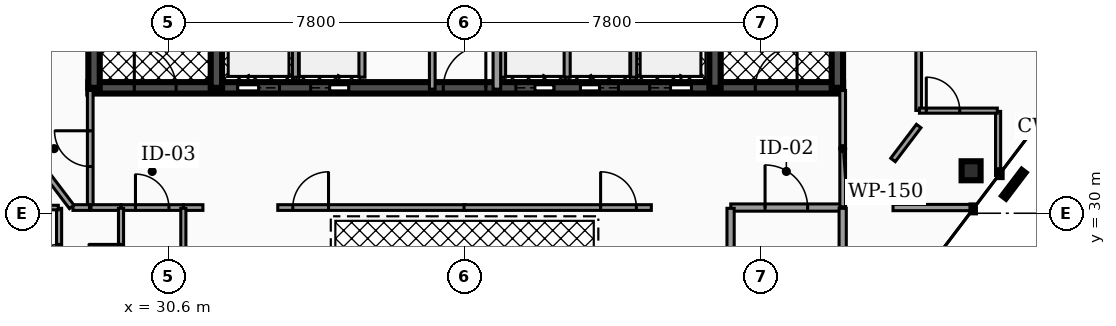
"""IFC4 building model, lengths in metres.
Left out: names, types, materials, properties, quantities, classifications, styles, units other than length and angle.
Written with IfcOpenShell. Run it as: python <this file> out.ifc"""

import sys

from ifc_helpers import new_model, si_unit, direction, frame, frame_2d, origin, origin_2d, place, context, subcontext, project, spatial, rectangle, hollow_rectangle, extrude, element, fill, save


model = new_model("IFC4")
c1 = context("Model", 3, precision=1e-05, world=origin(), true_north=direction((0.0, 1.0)))
c2 = subcontext(c1, "Body", "Model", "MODEL_VIEW")
j1 = project(units=[si_unit("LENGTHUNIT", "METRE"), si_unit("PLANEANGLEUNIT", "RADIAN")], contexts=[c1])
p1 = place(None, origin())
s1 = spatial("IfcSite", under=j1, at=p1, CompositionType="ELEMENT")
p2 = place(p1, origin())
s2 = spatial("IfcBuilding", under=s1, at=p2, CompositionType="ELEMENT")
p3 = place(p2, frame((0.0, 0.0, 261.8)))
s3 = spatial("IfcBuildingStorey", under=s2, at=p3, CompositionType="ELEMENT", Elevation=261.8)
p4 = place(p3, frame((28.5, 33.3, 0.0), z_axis=(0.0, 0.0, 1.0), x_axis=(1.0, 0.0, 0.0)))
e1 = element("IfcWall", 1, at=p4, inside=s3, PredefinedType="SHEAR", context=c2, shape_type="SweptSolid", body=[
    extrude(rectangle(XDim=19.86, YDim=0.3, at=frame_2d((9.93, 0.0))), origin(), (0.0, 0.0, 1.0), 3.18),
])
p5 = place(p4, frame((3.93, 0.0, 0.0)))
e2 = element("IfcOpeningElement", 2, at=p5, cuts=e1, PredefinedType="OPENING", context=c2, shape_type="SweptSolid", body=[
    extrude(rectangle(XDim=1.1, YDim=2.15, at=frame_2d((0.55, 1.075))), frame((0.0, 0.16, 0.0), z_axis=(0.0, -1.0, 0.0), x_axis=(1.0, 0.0, 0.0)), (0.0, 0.0, 1.0), 0.32),
])
p6 = place(p4, frame((14.77, 0.0, 0.0)))
e3 = element("IfcOpeningElement", 3, at=p6, cuts=e1, PredefinedType="OPENING", context=c2, shape_type="SweptSolid", body=[
    extrude(rectangle(XDim=1.1, YDim=2.15, at=frame_2d((0.55, 1.075))), frame((0.0, 0.16, 0.0), z_axis=(0.0, -1.0, 0.0), x_axis=(1.0, 0.0, 0.0)), (0.0, 0.0, 1.0), 0.32),
])
p7 = place(p4, frame((11.25, 0.0, 0.0)))
e4 = element("IfcOpeningElement", 4, at=p7, cuts=e1, PredefinedType="OPENING", context=c2, shape_type="SweptSolid", body=[
    extrude(rectangle(XDim=1.0, YDim=2.1, at=frame_2d((0.5, 1.05))), frame((0.0, 0.16, 0.0), z_axis=(0.0, -1.0, 0.0), x_axis=(1.0, 0.0, 0.0)), (0.0, 0.0, 1.0), 0.32),
])
p8 = place(p4, frame((12.95, 0.0, 0.0)))
e5 = element("IfcOpeningElement", 5, at=p8, cuts=e1, PredefinedType="OPENING", context=c2, shape_type="SweptSolid", body=[
    extrude(rectangle(XDim=1.0, YDim=2.1, at=frame_2d((0.5, 1.05))), frame((0.0, 0.16, 0.0), z_axis=(0.0, -1.0, 0.0), x_axis=(1.0, 0.0, 0.0)), (0.0, 0.0, 1.0), 0.32),
])
p9 = place(p4, frame((5.85, 0.0, 0.0)))
e6 = element("IfcOpeningElement", 6, at=p9, cuts=e1, PredefinedType="OPENING", context=c2, shape_type="SweptSolid", body=[
    extrude(rectangle(XDim=1.0, YDim=2.1, at=frame_2d((0.5, 1.05))), frame((0.0, 0.16, 0.0), z_axis=(0.0, -1.0, 0.0), x_axis=(1.0, 0.0, 0.0)), (0.0, 0.0, 1.0), 0.32),
])
p10 = place(p4, frame((1.21, 0.0, 0.0)))
e7 = element("IfcOpeningElement", 7, at=p10, cuts=e1, PredefinedType="OPENING", context=c2, shape_type="SweptSolid", body=[
    extrude(rectangle(XDim=1.1, YDim=2.2, at=frame_2d((0.55, 1.1))), frame((0.0, 0.16, 0.0), z_axis=(0.0, -1.0, 0.0), x_axis=(1.0, 0.0, 0.0)), (0.0, 0.0, 1.0), 0.32),
])
p11 = place(p4, frame((9.34, 0.0, 0.0)))
e8 = element("IfcOpeningElement", 8, at=p11, cuts=e1, PredefinedType="OPENING", context=c2, shape_type="SweptSolid", body=[
    extrude(rectangle(XDim=1.12, YDim=2.05, at=frame_2d((0.56, 1.025))), frame((0.0, 0.16, 0.0), z_axis=(0.0, -1.0, 0.0), x_axis=(1.0, 0.0, 0.0)), (0.0, 0.0, 1.0), 0.32),
])
p12 = place(p4, frame((17.55, 0.0, 0.0)))
e9 = element("IfcOpeningElement", 9, at=p12, cuts=e1, PredefinedType="OPENING", context=c2, shape_type="SweptSolid", body=[
    extrude(rectangle(XDim=1.1, YDim=2.2, at=frame_2d((0.55, 1.1))), frame((0.0, 0.16, 0.0), z_axis=(0.0, -1.0, 0.0), x_axis=(1.0, 0.0, 0.0)), (0.0, 0.0, 1.0), 0.32),
])
for number, where, z_axis, x_axis in (
    (10, (28.65, 33.3, 0.0), (0.0, 0.0, 1.0), (0.0, 1.0, 0.0)),
    (11, (31.87, 33.3, 0.0), (0.0, 0.0, 1.0), (0.0, 1.0, 0.0)),
    (12, (44.99, 33.3, 0.0), (0.0, 0.0, 1.0), (0.0, 1.0, 0.0)),
    (13, (48.21, 33.3, 0.0), (0.0, 0.0, 1.0), (0.0, 1.0, 0.0)),
):
    element("IfcWall", number, at=place(p3, frame(where, z_axis=z_axis, x_axis=x_axis)), inside=s3, PredefinedType="SHEAR", context=c2, shape_type="SweptSolid", body=[
        extrude(rectangle(XDim=10.1, YDim=0.3, at=frame_2d((5.05, 0.0))), origin(), (0.0, 0.0, 1.0), 3.18),
    ])
p13 = place(p3, frame((51.729, 31.117, 0.0), z_axis=(0.0, 0.0, 1.0), x_axis=(1.0, 0.0, 0.0)))
e14 = element("IfcColumn", 14, at=p13, inside=s3, PredefinedType="COLUMN", context=c2, shape_type="SweptSolid", body=[
    extrude(hollow_rectangle(XDim=0.5, YDim=0.5, WallThickness=0.025, at=origin_2d()), origin(), (0.0, 0.0, 1.0), 3.18),
])
for number, where, z_axis, x_axis in (
    (15, (33.95, 33.58, 0.0), (0.0, 0.0, 1.0), (0.0, 1.0, 0.0)),
    (16, (42.85, 33.58, 0.0), (0.0, 0.0, 1.0), (0.0, 1.0, 0.0)),
):
    element("IfcWall", number, at=place(p3, frame(where, z_axis=z_axis, x_axis=x_axis)), inside=s3, PredefinedType="SOLIDWALL", context=c2, shape_type="SweptSolid", body=[
        extrude(rectangle(XDim=2.45, YDim=0.16, at=frame_2d((1.225, 0.0))), origin(), (0.0, 0.0, 1.0), 3.18),
    ])
for number, where, z_axis, x_axis in (
    (17, (39.4, 33.58, 0.0), (0.0, 0.0, 1.0), (0.0, 1.0, 0.0)),
    (18, (41.1, 33.58, 0.0), (0.0, 0.0, 1.0), (0.0, 1.0, 0.0)),
    (19, (35.7, 33.58, 0.0), (0.0, 0.0, 1.0), (0.0, 1.0, 0.0)),
):
    element("IfcWall", number, at=place(p3, frame(where, z_axis=z_axis, x_axis=x_axis)), inside=s3, PredefinedType="SOLIDWALL", context=c2, shape_type="SweptSolid", body=[
        extrude(rectangle(XDim=2.25, YDim=0.16, at=frame_2d((1.125, 0.0))), origin(), (0.0, 0.0, 1.0), 3.18),
    ])
p14 = place(p3, frame((37.55, 33.265, 0.0), z_axis=(0.0, 0.0, 1.0), x_axis=(0.0, 1.0, 0.0)))
e20 = element("IfcWall", 20, at=p14, inside=s3, PredefinedType="PARTITIONING", context=c2, shape_type="SweptSolid", body=[
    extrude(rectangle(XDim=3.615, YDim=0.15, at=frame_2d((1.808, 0.0))), origin(), (0.0, 0.0, 1.0), 2.235),
])
p15 = place(p14, frame((1.337, 0.0, 0.0)))
e21 = element("IfcOpeningElement", 21, at=p15, cuts=e20, PredefinedType="OPENING", context=c2, shape_type="SweptSolid", body=[
    extrude(rectangle(XDim=0.94, YDim=2.05, at=frame_2d((0.47, 1.025))), frame((0.0, 0.085, 0.0), z_axis=(0.0, -1.0, 0.0), x_axis=(1.0, 0.0, 0.0)), (0.0, 0.0, 1.0), 0.17),
])
p16 = place(p3, frame((39.25, 33.265, 0.0), z_axis=(0.0, 0.0, 1.0), x_axis=(0.0, 1.0, 0.0)))
e22 = element("IfcWall", 22, at=p16, inside=s3, PredefinedType="PARTITIONING", context=c2, shape_type="SweptSolid", body=[
    extrude(rectangle(XDim=3.615, YDim=0.2, at=frame_2d((1.808, 0.0))), origin(), (0.0, 0.0, 1.0), 2.235),
])
p17 = place(p3, frame((45.405, 30.15, 0.0), z_axis=(0.0, 0.0, 1.0), x_axis=(1.0, 0.0, 0.0)))
e23 = element("IfcWall", 23, at=p17, inside=s3, PredefinedType="PARTITIONING", context=c2, shape_type="SweptSolid", body=[
    extrude(rectangle(XDim=2.925, YDim=0.19, at=frame_2d((1.462, 0.0))), origin(), (0.0, 0.0, 1.0), 2.235),
])
p18 = place(p17, frame((0.903, 0.0, 0.0)))
e24 = element("IfcOpeningElement", 24, at=p18, cuts=e23, PredefinedType="OPENING", context=c2, shape_type="SweptSolid", body=[
    extrude(rectangle(XDim=1.12, YDim=2.05, at=frame_2d((0.56, 1.025))), frame((0.0, 0.105, 0.0), z_axis=(0.0, -1.0, 0.0), x_axis=(1.0, 0.0, 0.0)), (0.0, 0.0, 1.0), 0.21),
])
p19 = place(p3, frame((28.55, 30.17, 0.0), z_axis=(0.0, 0.0, 1.0), x_axis=(0.0, 1.0, 0.0)))
e25 = element("IfcWall", 25, at=p19, inside=s3, PredefinedType="PARTITIONING", context=c2, shape_type="SweptSolid", body=[
    extrude(rectangle(XDim=3.06, YDim=0.15, at=frame_2d((1.53, 0.0))), origin(), (0.0, 0.0, 1.0), 2.235),
])
p20 = place(p19, frame((1.06, 0.0, 0.0)))
e26 = element("IfcOpeningElement", 26, at=p20, cuts=e25, PredefinedType="OPENING", context=c2, shape_type="SweptSolid", body=[
    extrude(rectangle(XDim=0.94, YDim=2.05, at=frame_2d((0.47, 1.025))), frame((0.0, 0.085, 0.0), z_axis=(0.0, -1.0, 0.0), x_axis=(1.0, 0.0, 0.0)), (0.0, 0.0, 1.0), 0.17),
])
p21 = place(p3, frame((48.35, 30.17, 0.0), z_axis=(0.0, 0.0, 1.0), x_axis=(0.0, 1.0, 0.0)))
e27 = element("IfcWall", 27, at=p21, inside=s3, PredefinedType="PARTITIONING", context=c2, shape_type="SweptSolid", body=[
    extrude(rectangle(XDim=3.06, YDim=0.15, at=frame_2d((1.53, 0.0))), origin(), (0.0, 0.0, 1.0), 2.235),
])
p22 = place(p3, frame((28.57, 30.15, 0.0), z_axis=(0.0, 0.0, 1.0), x_axis=(1.0, 0.0, 0.0)))
e28 = element("IfcWall", 28, at=p22, inside=s3, PredefinedType="PARTITIONING", context=c2, shape_type="SweptSolid", body=[
    extrude(rectangle(XDim=0.785, YDim=0.15, at=frame_2d((0.393, 0.0))), origin(), (0.0, 0.0, 1.0), 2.235),
])
p23 = place(p3, frame((29.365, 30.15, 0.0), z_axis=(0.0, 0.0, 1.0), x_axis=(1.0, 0.0, 0.0)))
e29 = element("IfcWall", 29, at=p23, inside=s3, PredefinedType="PARTITIONING", context=c2, shape_type="SweptSolid", body=[
    extrude(rectangle(XDim=1.63, YDim=0.15, at=frame_2d((0.815, 0.0))), origin(), (0.0, 0.0, 1.0), 2.235),
])
p24 = place(p23, frame((0.375, 0.0, 0.0)))
e30 = element("IfcOpeningElement", 30, at=p24, cuts=e29, PredefinedType="OPENING", context=c2, shape_type="SweptSolid", body=[
    extrude(rectangle(XDim=0.88, YDim=2.05, at=frame_2d((0.44, 1.025))), frame((0.0, 0.085, 0.0), z_axis=(0.0, -1.0, 0.0), x_axis=(1.0, 0.0, 0.0)), (0.0, 0.0, 1.0), 0.17),
])
p25 = place(p3, frame((33.485, 30.15, 0.0), z_axis=(0.0, 0.0, 1.0), x_axis=(1.0, 0.0, 0.0)))
e31 = element("IfcWall", 31, at=p25, inside=s3, PredefinedType="PARTITIONING", context=c2, shape_type="SweptSolid", body=[
    extrude(rectangle(XDim=4.93, YDim=0.15, at=frame_2d((2.465, 0.0))), origin(), (0.0, 0.0, 1.0), 2.235),
])
p26 = place(p25, frame((0.395, 0.0, 0.0)))
e32 = element("IfcOpeningElement", 32, at=p26, cuts=e31, PredefinedType="OPENING", context=c2, shape_type="SweptSolid", body=[
    extrude(rectangle(XDim=0.94, YDim=2.05, at=frame_2d((0.47, 1.025))), frame((0.0, 0.085, 0.0), z_axis=(0.0, -1.0, 0.0), x_axis=(1.0, 0.0, 0.0)), (0.0, 0.0, 1.0), 0.17),
])
p27 = place(p3, frame((31.005, 30.15, 0.0), z_axis=(0.0, 0.0, 1.0), x_axis=(1.0, 0.0, 0.0)))
e33 = element("IfcWall", 33, at=p27, inside=s3, PredefinedType="PARTITIONING", context=c2, shape_type="SweptSolid", body=[
    extrude(rectangle(XDim=0.51, YDim=0.15, at=frame_2d((0.255, 0.0))), origin(), (0.0, 0.0, 1.0), 2.235),
])
p28 = place(p3, frame((38.385, 30.15, 0.0), z_axis=(0.0, 0.0, 1.0), x_axis=(1.0, 0.0, 0.0)))
e34 = element("IfcWall", 34, at=p28, inside=s3, PredefinedType="PARTITIONING", context=c2, shape_type="SweptSolid", body=[
    extrude(rectangle(XDim=4.93, YDim=0.15, at=frame_2d((2.465, 0.0))), origin(), (0.0, 0.0, 1.0), 2.235),
])
p29 = place(p28, frame((3.595, 0.0, 0.0)))
e35 = element("IfcOpeningElement", 35, at=p29, cuts=e34, PredefinedType="OPENING", context=c2, shape_type="SweptSolid", body=[
    extrude(rectangle(XDim=0.94, YDim=2.05, at=frame_2d((0.47, 1.025))), frame((0.0, 0.085, 0.0), z_axis=(0.0, -1.0, 0.0), x_axis=(1.0, 0.0, 0.0)), (0.0, 0.0, 1.0), 0.17),
])
for number, where, z_axis, x_axis in (
    (36, (45.4, 27.37, 0.0), (0.0, 0.0, 1.0), (0.0, 1.0, 0.0)),
    (37, (48.35, 27.37, 0.0), (0.0, 0.0, 1.0), (0.0, 1.0, 0.0)),
):
    element("IfcWall", number, at=place(p3, frame(where, z_axis=z_axis, x_axis=x_axis)), inside=s3, PredefinedType="PARTITIONING", context=c2, shape_type="SweptSolid", body=[
        extrude(rectangle(XDim=2.76, YDim=0.19, at=frame_2d((1.38, 0.0))), origin(), (0.0, 0.0, 1.0), 2.235),
    ])
p30 = place(p3, frame((28.094, 30.15, 0.0), z_axis=(0.0, 0.0, 1.0), x_axis=(1.0, 0.0, 0.0)))
e38 = element("IfcWall", 38, at=p30, inside=s3, PredefinedType="PARTITIONING", context=c2, shape_type="SweptSolid", body=[
    extrude(rectangle(XDim=0.436, YDim=0.15, at=frame_2d((0.218, 0.0))), origin(), (0.0, 0.0, 1.0), 2.235),
])
p31 = place(p3, frame((26.562, 32.146, 0.0), z_axis=(0.0, 0.0, 1.0), x_axis=(0.603891739408, -0.797066350485, 0.0)))
e39 = element("IfcWall", 39, at=p31, inside=s3, PredefinedType="PARTITIONING", context=c2, shape_type="SweptSolid", body=[
    extrude(rectangle(XDim=2.485, YDim=0.15, at=frame_2d((1.242, 0.0))), origin(), (0.0, 0.0, 1.0), 2.235),
])
p32 = place(p3, frame((50.35, 32.705, 0.0), z_axis=(0.0, 0.0, 1.0), x_axis=(0.0, 1.0, 0.0)))
e40 = element("IfcWall", 40, at=p32, inside=s3, PredefinedType="PARTITIONING", context=c2, shape_type="SweptSolid", body=[
    extrude(rectangle(XDim=10.845, YDim=0.15, at=frame_2d((5.422, 0.0))), origin(), (0.0, 0.0, 1.0), 2.235),
])
p33 = place(p32, frame((4.952, 0.0, 0.0)))
e41 = element("IfcOpeningElement", 41, at=p33, cuts=e40, PredefinedType="OPENING", context=c2, shape_type="SweptSolid", body=[
    extrude(rectangle(XDim=0.94, YDim=2.05, at=frame_2d((0.47, 1.025))), frame((0.0, 0.085, 0.0), z_axis=(0.0, -1.0, 0.0), x_axis=(1.0, 0.0, 0.0)), (0.0, 0.0, 1.0), 0.17),
])
p34 = place(p3, frame((49.674, 31.403, 0.0), z_axis=(0.0, 0.0, 1.0), x_axis=(0.603937499622, 0.797031678511, 0.0)))
e42 = element("IfcWall", 42, at=p34, inside=s3, PredefinedType="PARTITIONING", context=c2, shape_type="SweptSolid", body=[
    extrude(rectangle(XDim=1.119, YDim=0.15, at=frame_2d((0.56, 0.0))), origin(), (0.0, 0.0, 1.0), 2.235),
])
p35 = place(p3, frame((29.36, 27.37, 0.0), z_axis=(0.0, 0.0, 1.0), x_axis=(0.0, 1.0, 0.0)))
e43 = element("IfcWall", 43, at=p35, inside=s3, PredefinedType="PARTITIONING", context=c2, shape_type="SweptSolid", body=[
    extrude(rectangle(XDim=2.76, YDim=0.135, at=frame_2d((1.38, 0.0))), origin(), (0.0, 0.0, 1.0), 2.235),
])
p36 = place(p35, frame((0.95, 0.0, 0.0)))
e44 = element("IfcOpeningElement", 44, at=p36, cuts=e43, PredefinedType="OPENING", context=c2, shape_type="SweptSolid", body=[
    extrude(rectangle(XDim=0.86, YDim=2.05, at=frame_2d((0.43, 1.025))), frame((0.0, 0.077, 0.0), z_axis=(0.0, -1.0, 0.0), x_axis=(1.0, 0.0, 0.0)), (0.0, 0.0, 1.0), 0.155),
])
p37 = place(p3, frame((27.73, 27.37, 0.0), z_axis=(0.0, 0.0, 1.0), x_axis=(0.0, 1.0, 0.0)))
e45 = element("IfcWall", 45, at=p37, inside=s3, PredefinedType="PARTITIONING", context=c2, shape_type="SweptSolid", body=[
    extrude(rectangle(XDim=2.76, YDim=0.135, at=frame_2d((1.38, 0.0))), origin(), (0.0, 0.0, 1.0), 2.235),
])
p38 = place(p37, frame((0.95, 0.0, 0.0)))
e46 = element("IfcOpeningElement", 46, at=p38, cuts=e45, PredefinedType="OPENING", context=c2, shape_type="SweptSolid", body=[
    extrude(rectangle(XDim=0.86, YDim=2.05, at=frame_2d((0.43, 1.025))), frame((0.0, 0.077, 0.0), z_axis=(0.0, -1.0, 0.0), x_axis=(1.0, 0.0, 0.0)), (0.0, 0.0, 1.0), 0.155),
])
p39 = place(p3, frame((31.0, 27.37, 0.0), z_axis=(0.0, 0.0, 1.0), x_axis=(0.0, 1.0, 0.0)))
e47 = element("IfcWall", 47, at=p39, inside=s3, PredefinedType="PARTITIONING", context=c2, shape_type="SweptSolid", body=[
    extrude(rectangle(XDim=2.76, YDim=0.135, at=frame_2d((1.38, 0.0))), origin(), (0.0, 0.0, 1.0), 2.235),
])
p40 = place(p3, frame((26.12, 30.15, 0.0), z_axis=(0.0, 0.0, 1.0), x_axis=(1.0, 0.0, 0.0)))
e48 = element("IfcWall", 48, at=p40, inside=s3, PredefinedType="PARTITIONING", context=c2, shape_type="SweptSolid", body=[
    extrude(rectangle(XDim=1.59, YDim=0.12, at=frame_2d((0.795, 0.0))), origin(), (0.0, 0.0, 1.0), 2.235),
])
p41 = place(p3, frame((49.674, 30.15, 0.0), z_axis=(0.0, 0.0, 1.0), x_axis=(1.0, 0.0, 0.0)))
e49 = element("IfcWall", 49, at=p41, inside=s3, PredefinedType="PARTITIONING", context=c2, shape_type="SweptSolid", body=[
    extrude(rectangle(XDim=2.122, YDim=0.165, at=frame_2d((1.061, 0.0))), origin(), (0.0, 0.0, 1.0), 2.235),
])
p42 = place(p3, frame((52.439, 30.994, 0.0), z_axis=(0.0, 0.0, 1.0), x_axis=(0.0, 1.0, 0.0)))
e50 = element("IfcWall", 50, at=p42, inside=s3, PredefinedType="PARTITIONING", context=c2, shape_type="SweptSolid", body=[
    extrude(rectangle(XDim=1.686, YDim=0.135, at=frame_2d((0.843, 0.0))), origin(), (0.0, 0.0, 1.0), 2.235),
])
p43 = place(p3, frame((50.37, 32.7, 0.0), z_axis=(0.0, 0.0, 1.0), x_axis=(1.0, 0.0, 0.0)))
e51 = element("IfcWall", 51, at=p43, inside=s3, PredefinedType="PARTITIONING", context=c2, shape_type="SweptSolid", body=[
    extrude(rectangle(XDim=2.049, YDim=0.135, at=frame_2d((1.025, 0.0))), origin(), (0.0, 0.0, 1.0), 2.235),
])
p44 = place(p43, frame((0.18, 0.0, 0.0)))
e52 = element("IfcOpeningElement", 52, at=p44, cuts=e51, PredefinedType="OPENING", context=c2, shape_type="SweptSolid", body=[
    extrude(rectangle(XDim=0.88, YDim=2.05, at=frame_2d((0.44, 1.025))), frame((0.0, 0.077, 0.0), z_axis=(0.0, -1.0, 0.0), x_axis=(1.0, 0.0, 0.0)), (0.0, 0.0, 1.0), 0.155),
])
p45 = place(p5, origin())
e53 = element("IfcDoor", 53, at=p45, inside=s3, OperationType="SLIDING_TO_LEFT", PredefinedType="DOOR", context=c2, shape_type="SweptSolid", body=[
    extrude(rectangle(XDim=1.1, YDim=2.15, at=frame_2d((0.55, 1.075))), frame((0.0, 0.025, 0.0), z_axis=(0.0, -1.0, 0.0), x_axis=(1.0, 0.0, 0.0)), (0.0, 0.0, 1.0), 0.05),
])
fill(e2, e53)
p46 = place(p6, origin())
e54 = element("IfcDoor", 54, at=p46, inside=s3, OperationType="SLIDING_TO_RIGHT", PredefinedType="DOOR", context=c2, shape_type="SweptSolid", body=[
    extrude(rectangle(XDim=1.1, YDim=2.15, at=frame_2d((0.55, 1.075))), frame((0.0, 0.025, 0.0), z_axis=(0.0, -1.0, 0.0), x_axis=(1.0, 0.0, 0.0)), (0.0, 0.0, 1.0), 0.05),
])
fill(e3, e54)
p47 = place(p7, origin())
e55 = element("IfcDoor", 55, at=p47, inside=s3, OperationType="SLIDING_TO_RIGHT", PredefinedType="DOOR", context=c2, shape_type="SweptSolid", body=[
    extrude(rectangle(XDim=1.0, YDim=2.1, at=frame_2d((0.5, 1.05))), frame((0.0, 0.025, 0.0), z_axis=(0.0, -1.0, 0.0), x_axis=(1.0, 0.0, 0.0)), (0.0, 0.0, 1.0), 0.05),
])
fill(e4, e55)
p48 = place(p8, origin())
e56 = element("IfcDoor", 56, at=p48, inside=s3, OperationType="SLIDING_TO_LEFT", PredefinedType="DOOR", context=c2, shape_type="SweptSolid", body=[
    extrude(rectangle(XDim=1.0, YDim=2.1, at=frame_2d((0.5, 1.05))), frame((0.0, 0.025, 0.0), z_axis=(0.0, -1.0, 0.0), x_axis=(1.0, 0.0, 0.0)), (0.0, 0.0, 1.0), 0.05),
])
fill(e5, e56)
p49 = place(p9, origin())
e57 = element("IfcDoor", 57, at=p49, inside=s3, OperationType="SLIDING_TO_RIGHT", PredefinedType="DOOR", context=c2, shape_type="SweptSolid", body=[
    extrude(rectangle(XDim=1.0, YDim=2.1, at=frame_2d((0.5, 1.05))), frame((0.0, 0.025, 0.0), z_axis=(0.0, -1.0, 0.0), x_axis=(1.0, 0.0, 0.0)), (0.0, 0.0, 1.0), 0.05),
])
fill(e6, e57)
p50 = place(p10, origin())
e58 = element("IfcDoor", 58, at=p50, inside=s3, OperationType="SINGLE_SWING_LEFT", PredefinedType="DOOR", context=c2, shape_type="SweptSolid", body=[
    extrude(rectangle(XDim=1.1, YDim=2.2, at=frame_2d((0.55, 1.1))), frame((0.0, 0.025, 0.0), z_axis=(0.0, -1.0, 0.0), x_axis=(1.0, 0.0, 0.0)), (0.0, 0.0, 1.0), 0.05),
])
fill(e7, e58)
p51 = place(p11, origin())
e59 = element("IfcDoor", 59, at=p51, inside=s3, OperationType="SINGLE_SWING_RIGHT", PredefinedType="DOOR", context=c2, shape_type="SweptSolid", body=[
    extrude(rectangle(XDim=1.12, YDim=2.05, at=frame_2d((0.56, 1.025))), frame((0.0, 0.025, 0.0), z_axis=(0.0, -1.0, 0.0), x_axis=(1.0, 0.0, 0.0)), (0.0, 0.0, 1.0), 0.05),
])
fill(e8, e59)
p52 = place(p12, origin())
e60 = element("IfcDoor", 60, at=p52, inside=s3, OperationType="SINGLE_SWING_RIGHT", PredefinedType="DOOR", context=c2, shape_type="SweptSolid", body=[
    extrude(rectangle(XDim=1.1, YDim=2.2, at=frame_2d((0.55, 1.1))), frame((0.0, 0.025, 0.0), z_axis=(0.0, -1.0, 0.0), x_axis=(1.0, 0.0, 0.0)), (0.0, 0.0, 1.0), 0.05),
])
fill(e9, e60)
p53 = place(p18, origin())
e61 = element("IfcDoor", 61, at=p53, inside=s3, OperationType="SINGLE_SWING_LEFT", PredefinedType="DOOR", context=c2, shape_type="SweptSolid", body=[
    extrude(rectangle(XDim=1.12, YDim=2.05, at=frame_2d((0.56, 1.025))), frame((0.0, 0.025, 0.0), z_axis=(0.0, -1.0, 0.0), x_axis=(1.0, 0.0, 0.0)), (0.0, 0.0, 1.0), 0.05),
])
fill(e24, e61)
p54 = place(p20, origin())
e62 = element("IfcDoor", 62, at=p54, inside=s3, OperationType="SINGLE_SWING_RIGHT", PredefinedType="DOOR", context=c2, shape_type="SweptSolid", body=[
    extrude(rectangle(XDim=0.94, YDim=2.05, at=frame_2d((0.47, 1.025))), frame((0.0, 0.025, 0.0), z_axis=(0.0, -1.0, 0.0), x_axis=(1.0, 0.0, 0.0)), (0.0, 0.0, 1.0), 0.05),
])
fill(e26, e62)
p55 = place(p24, origin())
e63 = element("IfcDoor", 63, at=p55, inside=s3, OperationType="SINGLE_SWING_LEFT", PredefinedType="DOOR", context=c2, shape_type="SweptSolid", body=[
    extrude(rectangle(XDim=0.88, YDim=2.05, at=frame_2d((0.44, 1.025))), frame((0.0, 0.025, 0.0), z_axis=(0.0, -1.0, 0.0), x_axis=(1.0, 0.0, 0.0)), (0.0, 0.0, 1.0), 0.05),
])
fill(e30, e63)
p56 = place(p26, origin())
e64 = element("IfcDoor", 64, at=p56, inside=s3, OperationType="SINGLE_SWING_RIGHT", PredefinedType="DOOR", context=c2, shape_type="SweptSolid", body=[
    extrude(rectangle(XDim=0.94, YDim=2.05, at=frame_2d((0.47, 1.025))), frame((0.0, 0.025, 0.0), z_axis=(0.0, -1.0, 0.0), x_axis=(1.0, 0.0, 0.0)), (0.0, 0.0, 1.0), 0.05),
])
fill(e32, e64)
p57 = place(p29, origin())
e65 = element("IfcDoor", 65, at=p57, inside=s3, OperationType="SINGLE_SWING_LEFT", PredefinedType="DOOR", context=c2, shape_type="SweptSolid", body=[
    extrude(rectangle(XDim=0.94, YDim=2.05, at=frame_2d((0.47, 1.025))), frame((0.0, 0.025, 0.0), z_axis=(0.0, -1.0, 0.0), x_axis=(1.0, 0.0, 0.0)), (0.0, 0.0, 1.0), 0.05),
])
fill(e35, e65)
p58 = place(p36, origin())
e66 = element("IfcDoor", 66, at=p58, inside=s3, OperationType="SINGLE_SWING_RIGHT", PredefinedType="DOOR", context=c2, shape_type="SweptSolid", body=[
    extrude(rectangle(XDim=0.86, YDim=2.05, at=frame_2d((0.43, 1.025))), frame((0.0, 0.025, 0.0), z_axis=(0.0, -1.0, 0.0), x_axis=(1.0, 0.0, 0.0)), (0.0, 0.0, 1.0), 0.05),
])
fill(e44, e66)
p59 = place(p38, origin())
e67 = element("IfcDoor", 67, at=p59, inside=s3, OperationType="SINGLE_SWING_LEFT", PredefinedType="DOOR", context=c2, shape_type="SweptSolid", body=[
    extrude(rectangle(XDim=0.86, YDim=2.05, at=frame_2d((0.43, 1.025))), frame((0.0, 0.025, 0.0), z_axis=(0.0, -1.0, 0.0), x_axis=(1.0, 0.0, 0.0)), (0.0, 0.0, 1.0), 0.05),
])
fill(e46, e67)
p60 = place(p44, origin())
e68 = element("IfcDoor", 68, at=p60, inside=s3, OperationType="SINGLE_SWING_LEFT", PredefinedType="DOOR", context=c2, shape_type="SweptSolid", body=[
    extrude(rectangle(XDim=0.88, YDim=2.05, at=frame_2d((0.44, 1.025))), frame((0.0, 0.025, 0.0), z_axis=(0.0, -1.0, 0.0), x_axis=(1.0, 0.0, 0.0)), (0.0, 0.0, 1.0), 0.05),
])
fill(e52, e68)
save(model, sys.argv[1])
